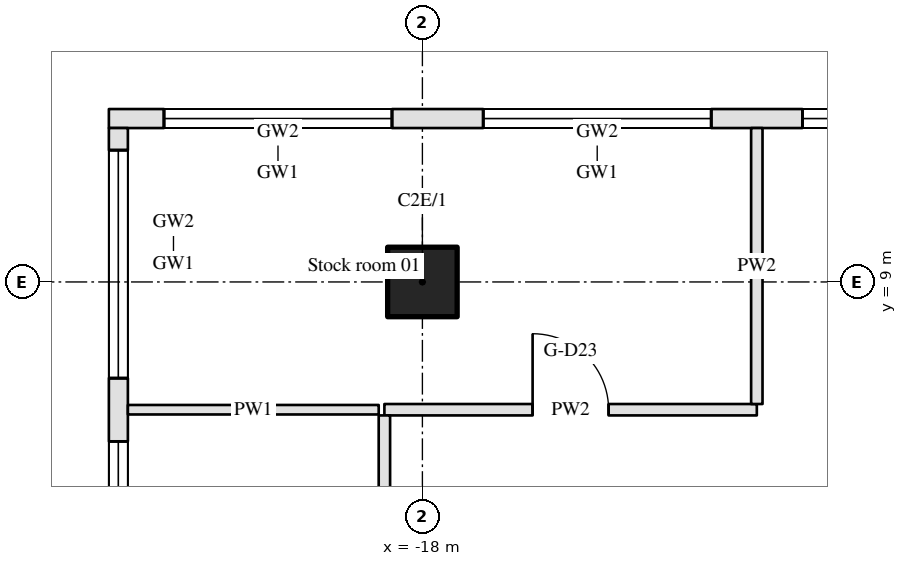
"""IFC4 building model, lengths in metres.
Left out: names, types, materials, properties, quantities, classifications, styles, units other than length and angle.
Written with IfcOpenShell. Run it as: python <this file> out.ifc"""

import sys

from ifc_helpers import new_model, si_unit, direction, frame, frame_2d, origin, origin_2d, place, context, subcontext, project, spatial, rectangle, hollow_circle, extrude, element, fill, save


model = new_model("IFC4")
c1 = context("Model", 3, precision=1e-05, world=origin(), true_north=direction((0.0, 1.0)))
c2 = subcontext(c1, "Body", "Model", "MODEL_VIEW")
j1 = project(units=[si_unit("LENGTHUNIT", "METRE"), si_unit("PLANEANGLEUNIT", "RADIAN")], contexts=[c1])
p1 = place(None, origin())
s1 = spatial("IfcSite", under=j1, at=p1, CompositionType="ELEMENT")
p2 = place(p1, origin())
s2 = spatial("IfcBuilding", under=s1, at=p2, CompositionType="ELEMENT")
p3 = place(p2, origin())
s3 = spatial("IfcBuildingStorey", under=s2, at=p3, CompositionType="ELEMENT", Elevation=0.0)
p4 = place(p3, frame((-18.0, 9.0, 0.0), z_axis=(0.0, 0.0, 1.0), x_axis=(1.0, 0.0, 0.0)))
e1 = element("IfcColumn", 1, at=p4, inside=s3, PredefinedType="COLUMN", context=c2, shape_type="SweptSolid", body=[
    extrude(hollow_circle(Radius=0.457, WallThickness=0.05, at=origin_2d()), origin(), (0.0, 0.0, 1.0), 10.8),
])
p5 = place(p3, frame((20.125, 11.15, 0.0), z_axis=(0.0, 0.0, 1.0), x_axis=(-1.0, 0.0, 0.0)))
e2 = element("IfcWall", 2, at=p5, inside=s3, PredefinedType="STANDARD", context=c2, shape_type="SweptSolid", body=[
    extrude(rectangle(XDim=42.25, YDim=0.25, at=frame_2d((21.125, 0.0))), origin(), (0.0, 0.0, 1.0), 10.0),
])
p6 = place(p5, frame((0.725, 0.0, 0.15)))
e3 = element("IfcOpeningElement", 3, at=p6, cuts=e2, PredefinedType="OPENING", context=c2, shape_type="SweptSolid", body=[
    extrude(rectangle(XDim=3.0, YDim=4.2, at=frame_2d((1.5, 2.1))), frame((0.0, 0.135, 0.0), z_axis=(0.0, -1.0, 0.0), x_axis=(1.0, 0.0, 0.0)), (0.0, 0.0, 1.0), 0.27),
])
p7 = place(p5, frame((0.725, 0.0, 4.95)))
e4 = element("IfcOpeningElement", 4, at=p7, cuts=e2, PredefinedType="OPENING", context=c2, shape_type="SweptSolid", body=[
    extrude(rectangle(XDim=3.0, YDim=4.4, at=frame_2d((1.5, 2.2))), frame((0.0, 0.135, 0.0), z_axis=(0.0, -1.0, 0.0), x_axis=(1.0, 0.0, 0.0)), (0.0, 0.0, 1.0), 0.27),
])
p8 = place(p5, frame((4.925, 0.0, 0.15)))
e5 = element("IfcOpeningElement", 5, at=p8, cuts=e2, PredefinedType="OPENING", context=c2, shape_type="SweptSolid", body=[
    extrude(rectangle(XDim=3.0, YDim=4.2, at=frame_2d((1.5, 2.1))), frame((0.0, 0.135, 0.0), z_axis=(0.0, -1.0, 0.0), x_axis=(1.0, 0.0, 0.0)), (0.0, 0.0, 1.0), 0.27),
])
p9 = place(p5, frame((4.925, 0.0, 4.95)))
e6 = element("IfcOpeningElement", 6, at=p9, cuts=e2, PredefinedType="OPENING", context=c2, shape_type="SweptSolid", body=[
    extrude(rectangle(XDim=3.0, YDim=4.4, at=frame_2d((1.5, 2.2))), frame((0.0, 0.135, 0.0), z_axis=(0.0, -1.0, 0.0), x_axis=(1.0, 0.0, 0.0)), (0.0, 0.0, 1.0), 0.27),
])
p10 = place(p5, frame((9.125, 0.0, 0.15)))
e7 = element("IfcOpeningElement", 7, at=p10, cuts=e2, PredefinedType="OPENING", context=c2, shape_type="SweptSolid", body=[
    extrude(rectangle(XDim=3.0, YDim=4.2, at=frame_2d((1.5, 2.1))), frame((0.0, 0.135, 0.0), z_axis=(0.0, -1.0, 0.0), x_axis=(1.0, 0.0, 0.0)), (0.0, 0.0, 1.0), 0.27),
])
p11 = place(p5, frame((9.125, 0.0, 4.95)))
e8 = element("IfcOpeningElement", 8, at=p11, cuts=e2, PredefinedType="OPENING", context=c2, shape_type="SweptSolid", body=[
    extrude(rectangle(XDim=3.0, YDim=4.4, at=frame_2d((1.5, 2.2))), frame((0.0, 0.135, 0.0), z_axis=(0.0, -1.0, 0.0), x_axis=(1.0, 0.0, 0.0)), (0.0, 0.0, 1.0), 0.27),
])
p12 = place(p5, frame((13.925, 0.0, 0.0)))
e9 = element("IfcOpeningElement", 9, at=p12, cuts=e2, PredefinedType="OPENING", context=c2, shape_type="SweptSolid", body=[
    extrude(rectangle(XDim=1.8, YDim=2.4, at=frame_2d((0.9, 1.2))), frame((0.0, 0.135, 0.0), z_axis=(0.0, -1.0, 0.0), x_axis=(1.0, 0.0, 0.0)), (0.0, 0.0, 1.0), 0.27),
])
p13 = place(p5, frame((17.525, 0.0, 0.15)))
e10 = element("IfcOpeningElement", 10, at=p13, cuts=e2, PredefinedType="OPENING", context=c2, shape_type="SweptSolid", body=[
    extrude(rectangle(XDim=3.0, YDim=4.2, at=frame_2d((1.5, 2.1))), frame((0.0, 0.135, 0.0), z_axis=(0.0, -1.0, 0.0), x_axis=(1.0, 0.0, 0.0)), (0.0, 0.0, 1.0), 0.27),
])
p14 = place(p5, frame((17.525, 0.0, 4.95)))
e11 = element("IfcOpeningElement", 11, at=p14, cuts=e2, PredefinedType="OPENING", context=c2, shape_type="SweptSolid", body=[
    extrude(rectangle(XDim=3.0, YDim=4.4, at=frame_2d((1.5, 2.2))), frame((0.0, 0.135, 0.0), z_axis=(0.0, -1.0, 0.0), x_axis=(1.0, 0.0, 0.0)), (0.0, 0.0, 1.0), 0.27),
])
p15 = place(p5, frame((21.725, 0.0, 0.15)))
e12 = element("IfcOpeningElement", 12, at=p15, cuts=e2, PredefinedType="OPENING", context=c2, shape_type="SweptSolid", body=[
    extrude(rectangle(XDim=3.0, YDim=4.2, at=frame_2d((1.5, 2.1))), frame((0.0, 0.135, 0.0), z_axis=(0.0, -1.0, 0.0), x_axis=(1.0, 0.0, 0.0)), (0.0, 0.0, 1.0), 0.27),
])
p16 = place(p5, frame((21.725, 0.0, 4.95)))
e13 = element("IfcOpeningElement", 13, at=p16, cuts=e2, PredefinedType="OPENING", context=c2, shape_type="SweptSolid", body=[
    extrude(rectangle(XDim=3.0, YDim=4.4, at=frame_2d((1.5, 2.2))), frame((0.0, 0.135, 0.0), z_axis=(0.0, -1.0, 0.0), x_axis=(1.0, 0.0, 0.0)), (0.0, 0.0, 1.0), 0.27),
])
p17 = place(p5, frame((26.225, 0.0, 0.0)))
e14 = element("IfcOpeningElement", 14, at=p17, cuts=e2, PredefinedType="OPENING", context=c2, shape_type="SweptSolid", body=[
    extrude(rectangle(XDim=2.4, YDim=2.6, at=frame_2d((1.2, 1.3))), frame((0.0, 0.135, 0.0), z_axis=(0.0, -1.0, 0.0), x_axis=(1.0, 0.0, 0.0)), (0.0, 0.0, 1.0), 0.27),
])
p18 = place(p5, frame((25.925, 0.0, 2.9)))
e15 = element("IfcOpeningElement", 15, at=p18, cuts=e2, PredefinedType="OPENING", context=c2, shape_type="SweptSolid", body=[
    extrude(rectangle(XDim=3.0, YDim=1.45, at=frame_2d((1.5, 0.725))), frame((0.0, 0.135, 0.0), z_axis=(0.0, -1.0, 0.0), x_axis=(1.0, 0.0, 0.0)), (0.0, 0.0, 1.0), 0.27),
])
p19 = place(p5, frame((25.925, 0.0, 4.95)))
e16 = element("IfcOpeningElement", 16, at=p19, cuts=e2, PredefinedType="OPENING", context=c2, shape_type="SweptSolid", body=[
    extrude(rectangle(XDim=3.0, YDim=4.4, at=frame_2d((1.5, 2.2))), frame((0.0, 0.135, 0.0), z_axis=(0.0, -1.0, 0.0), x_axis=(1.0, 0.0, 0.0)), (0.0, 0.0, 1.0), 0.27),
])
p20 = place(p5, frame((30.125, 0.0, 0.15)))
e17 = element("IfcOpeningElement", 17, at=p20, cuts=e2, PredefinedType="OPENING", context=c2, shape_type="SweptSolid", body=[
    extrude(rectangle(XDim=3.0, YDim=4.2, at=frame_2d((1.5, 2.1))), frame((0.0, 0.135, 0.0), z_axis=(0.0, -1.0, 0.0), x_axis=(1.0, 0.0, 0.0)), (0.0, 0.0, 1.0), 0.27),
])
p21 = place(p5, frame((30.125, 0.0, 4.95)))
e18 = element("IfcOpeningElement", 18, at=p21, cuts=e2, PredefinedType="OPENING", context=c2, shape_type="SweptSolid", body=[
    extrude(rectangle(XDim=3.0, YDim=4.4, at=frame_2d((1.5, 2.2))), frame((0.0, 0.135, 0.0), z_axis=(0.0, -1.0, 0.0), x_axis=(1.0, 0.0, 0.0)), (0.0, 0.0, 1.0), 0.27),
])
p22 = place(p5, frame((34.325, 0.0, 0.15)))
e19 = element("IfcOpeningElement", 19, at=p22, cuts=e2, PredefinedType="OPENING", context=c2, shape_type="SweptSolid", body=[
    extrude(rectangle(XDim=3.0, YDim=4.2, at=frame_2d((1.5, 2.1))), frame((0.0, 0.135, 0.0), z_axis=(0.0, -1.0, 0.0), x_axis=(1.0, 0.0, 0.0)), (0.0, 0.0, 1.0), 0.27),
])
p23 = place(p5, frame((34.325, 0.0, 4.95)))
e20 = element("IfcOpeningElement", 20, at=p23, cuts=e2, PredefinedType="OPENING", context=c2, shape_type="SweptSolid", body=[
    extrude(rectangle(XDim=3.0, YDim=4.4, at=frame_2d((1.5, 2.2))), frame((0.0, 0.135, 0.0), z_axis=(0.0, -1.0, 0.0), x_axis=(1.0, 0.0, 0.0)), (0.0, 0.0, 1.0), 0.27),
])
p24 = place(p5, frame((38.525, 0.0, 0.15)))
e21 = element("IfcOpeningElement", 21, at=p24, cuts=e2, PredefinedType="OPENING", context=c2, shape_type="SweptSolid", body=[
    extrude(rectangle(XDim=3.0, YDim=4.2, at=frame_2d((1.5, 2.1))), frame((0.0, 0.135, 0.0), z_axis=(0.0, -1.0, 0.0), x_axis=(1.0, 0.0, 0.0)), (0.0, 0.0, 1.0), 0.27),
])
p25 = place(p5, frame((38.525, 0.0, 4.95)))
e22 = element("IfcOpeningElement", 22, at=p25, cuts=e2, PredefinedType="OPENING", context=c2, shape_type="SweptSolid", body=[
    extrude(rectangle(XDim=3.0, YDim=4.4, at=frame_2d((1.5, 2.2))), frame((0.0, 0.135, 0.0), z_axis=(0.0, -1.0, 0.0), x_axis=(1.0, 0.0, 0.0)), (0.0, 0.0, 1.0), 0.27),
])
p26 = place(p3, frame((-22.0, 11.025, 0.0), z_axis=(0.0, 0.0, 1.0), x_axis=(0.0, -1.0, 0.0)))
e23 = element("IfcWall", 23, at=p26, inside=s3, PredefinedType="STANDARD", context=c2, shape_type="SweptSolid", body=[
    extrude(rectangle(XDim=30.4, YDim=0.25, at=frame_2d((15.2, 0.0))), origin(), (0.0, 0.0, 1.0), 10.0),
])
p27 = place(p26, frame((0.291, 0.0, 0.15)))
e24 = element("IfcOpeningElement", 24, at=p27, cuts=e23, PredefinedType="OPENING", context=c2, shape_type="SweptSolid", body=[
    extrude(rectangle(XDim=3.0, YDim=4.2, at=frame_2d((1.5, 2.1))), frame((0.0, 0.135, 0.0), z_axis=(0.0, -1.0, 0.0), x_axis=(1.0, 0.0, 0.0)), (0.0, 0.0, 1.0), 0.27),
])
p28 = place(p26, frame((0.291, 0.0, 4.95)))
e25 = element("IfcOpeningElement", 25, at=p28, cuts=e23, PredefinedType="OPENING", context=c2, shape_type="SweptSolid", body=[
    extrude(rectangle(XDim=3.0, YDim=4.4, at=frame_2d((1.5, 2.2))), frame((0.0, 0.135, 0.0), z_axis=(0.0, -1.0, 0.0), x_axis=(1.0, 0.0, 0.0)), (0.0, 0.0, 1.0), 0.27),
])
p29 = place(p26, frame((4.122, 0.0, 0.15)))
e26 = element("IfcOpeningElement", 26, at=p29, cuts=e23, PredefinedType="OPENING", context=c2, shape_type="SweptSolid", body=[
    extrude(rectangle(XDim=3.0, YDim=4.2, at=frame_2d((1.5, 2.1))), frame((0.0, 0.135, 0.0), z_axis=(0.0, -1.0, 0.0), x_axis=(1.0, 0.0, 0.0)), (0.0, 0.0, 1.0), 0.27),
])
p30 = place(p26, frame((4.122, 0.0, 4.95)))
e27 = element("IfcOpeningElement", 27, at=p30, cuts=e23, PredefinedType="OPENING", context=c2, shape_type="SweptSolid", body=[
    extrude(rectangle(XDim=3.0, YDim=4.4, at=frame_2d((1.5, 2.2))), frame((0.0, 0.135, 0.0), z_axis=(0.0, -1.0, 0.0), x_axis=(1.0, 0.0, 0.0)), (0.0, 0.0, 1.0), 0.27),
])
p31 = place(p26, frame((7.953, 0.0, 0.15)))
e28 = element("IfcOpeningElement", 28, at=p31, cuts=e23, PredefinedType="OPENING", context=c2, shape_type="SweptSolid", body=[
    extrude(rectangle(XDim=3.0, YDim=4.2, at=frame_2d((1.5, 2.1))), frame((0.0, 0.135, 0.0), z_axis=(0.0, -1.0, 0.0), x_axis=(1.0, 0.0, 0.0)), (0.0, 0.0, 1.0), 0.27),
])
p32 = place(p26, frame((7.953, 0.0, 4.95)))
e29 = element("IfcOpeningElement", 29, at=p32, cuts=e23, PredefinedType="OPENING", context=c2, shape_type="SweptSolid", body=[
    extrude(rectangle(XDim=3.0, YDim=4.4, at=frame_2d((1.5, 2.2))), frame((0.0, 0.135, 0.0), z_axis=(0.0, -1.0, 0.0), x_axis=(1.0, 0.0, 0.0)), (0.0, 0.0, 1.0), 0.27),
])
p33 = place(p26, frame((11.784, 0.0, 0.15)))
e30 = element("IfcOpeningElement", 30, at=p33, cuts=e23, PredefinedType="OPENING", context=c2, shape_type="SweptSolid", body=[
    extrude(rectangle(XDim=3.0, YDim=4.2, at=frame_2d((1.5, 2.1))), frame((0.0, 0.135, 0.0), z_axis=(0.0, -1.0, 0.0), x_axis=(1.0, 0.0, 0.0)), (0.0, 0.0, 1.0), 0.27),
])
p34 = place(p26, frame((11.784, 0.0, 4.95)))
e31 = element("IfcOpeningElement", 31, at=p34, cuts=e23, PredefinedType="OPENING", context=c2, shape_type="SweptSolid", body=[
    extrude(rectangle(XDim=3.0, YDim=4.4, at=frame_2d((1.5, 2.2))), frame((0.0, 0.135, 0.0), z_axis=(0.0, -1.0, 0.0), x_axis=(1.0, 0.0, 0.0)), (0.0, 0.0, 1.0), 0.27),
])
p35 = place(p26, frame((15.916, 0.0, 0.0)))
e32 = element("IfcOpeningElement", 32, at=p35, cuts=e23, PredefinedType="OPENING", context=c2, shape_type="SweptSolid", body=[
    extrude(rectangle(XDim=2.4, YDim=2.6, at=frame_2d((1.2, 1.3))), frame((0.0, 0.135, 0.0), z_axis=(0.0, -1.0, 0.0), x_axis=(1.0, 0.0, 0.0)), (0.0, 0.0, 1.0), 0.27),
])
p36 = place(p26, frame((15.616, 0.0, 2.9)))
e33 = element("IfcOpeningElement", 33, at=p36, cuts=e23, PredefinedType="OPENING", context=c2, shape_type="SweptSolid", body=[
    extrude(rectangle(XDim=3.0, YDim=1.45, at=frame_2d((1.5, 0.725))), frame((0.0, 0.135, 0.0), z_axis=(0.0, -1.0, 0.0), x_axis=(1.0, 0.0, 0.0)), (0.0, 0.0, 1.0), 0.27),
])
p37 = place(p26, frame((15.616, 0.0, 4.95)))
e34 = element("IfcOpeningElement", 34, at=p37, cuts=e23, PredefinedType="OPENING", context=c2, shape_type="SweptSolid", body=[
    extrude(rectangle(XDim=3.0, YDim=4.4, at=frame_2d((1.5, 2.2))), frame((0.0, 0.135, 0.0), z_axis=(0.0, -1.0, 0.0), x_axis=(1.0, 0.0, 0.0)), (0.0, 0.0, 1.0), 0.27),
])
p38 = place(p26, frame((19.447, 0.0, 0.15)))
e35 = element("IfcOpeningElement", 35, at=p38, cuts=e23, PredefinedType="OPENING", context=c2, shape_type="SweptSolid", body=[
    extrude(rectangle(XDim=3.0, YDim=4.2, at=frame_2d((1.5, 2.1))), frame((0.0, 0.135, 0.0), z_axis=(0.0, -1.0, 0.0), x_axis=(1.0, 0.0, 0.0)), (0.0, 0.0, 1.0), 0.27),
])
p39 = place(p26, frame((19.447, 0.0, 4.95)))
e36 = element("IfcOpeningElement", 36, at=p39, cuts=e23, PredefinedType="OPENING", context=c2, shape_type="SweptSolid", body=[
    extrude(rectangle(XDim=3.0, YDim=4.4, at=frame_2d((1.5, 2.2))), frame((0.0, 0.135, 0.0), z_axis=(0.0, -1.0, 0.0), x_axis=(1.0, 0.0, 0.0)), (0.0, 0.0, 1.0), 0.27),
])
p40 = place(p26, frame((23.278, 0.0, 0.15)))
e37 = element("IfcOpeningElement", 37, at=p40, cuts=e23, PredefinedType="OPENING", context=c2, shape_type="SweptSolid", body=[
    extrude(rectangle(XDim=3.0, YDim=4.2, at=frame_2d((1.5, 2.1))), frame((0.0, 0.135, 0.0), z_axis=(0.0, -1.0, 0.0), x_axis=(1.0, 0.0, 0.0)), (0.0, 0.0, 1.0), 0.27),
])
p41 = place(p26, frame((23.278, 0.0, 4.95)))
e38 = element("IfcOpeningElement", 38, at=p41, cuts=e23, PredefinedType="OPENING", context=c2, shape_type="SweptSolid", body=[
    extrude(rectangle(XDim=3.0, YDim=4.4, at=frame_2d((1.5, 2.2))), frame((0.0, 0.135, 0.0), z_axis=(0.0, -1.0, 0.0), x_axis=(1.0, 0.0, 0.0)), (0.0, 0.0, 1.0), 0.27),
])
p42 = place(p26, frame((27.109, 0.0, 0.15)))
e39 = element("IfcOpeningElement", 39, at=p42, cuts=e23, PredefinedType="OPENING", context=c2, shape_type="SweptSolid", body=[
    extrude(rectangle(XDim=3.0, YDim=4.2, at=frame_2d((1.5, 2.1))), frame((0.0, 0.135, 0.0), z_axis=(0.0, -1.0, 0.0), x_axis=(1.0, 0.0, 0.0)), (0.0, 0.0, 1.0), 0.27),
])
p43 = place(p26, frame((27.109, 0.0, 4.95)))
e40 = element("IfcOpeningElement", 40, at=p43, cuts=e23, PredefinedType="OPENING", context=c2, shape_type="SweptSolid", body=[
    extrude(rectangle(XDim=3.0, YDim=4.4, at=frame_2d((1.5, 2.2))), frame((0.0, 0.135, 0.0), z_axis=(0.0, -1.0, 0.0), x_axis=(1.0, 0.0, 0.0)), (0.0, 0.0, 1.0), 0.27),
])
p44 = place(p3, frame((-21.875, 7.319, 0.0), z_axis=(0.0, 0.0, 1.0), x_axis=(1.0, 0.0, 0.0)))
e41 = element("IfcWall", 41, at=p44, inside=s3, PredefinedType="PARTITIONING", context=c2, shape_type="SweptSolid", body=[
    extrude(rectangle(XDim=3.3, YDim=0.125, at=frame_2d((1.65, 0.0))), origin(), (0.0, 0.0, 1.0), 9.86),
])
p45 = place(p3, frame((-18.5, 7.319, 0.0), z_axis=(0.0, 0.0, 1.0), x_axis=(1.0, 0.0, 0.0)))
e42 = element("IfcWall", 42, at=p45, inside=s3, PredefinedType="PARTITIONING", context=c2, shape_type="SweptSolid", body=[
    extrude(rectangle(XDim=4.9, YDim=0.15, at=frame_2d((2.45, 0.0))), origin(), (0.0, 0.0, 1.0), 9.86),
])
p46 = place(p45, frame((1.95, 0.0, 0.0)))
e43 = element("IfcOpeningElement", 43, at=p46, cuts=e42, PredefinedType="OPENING", context=c2, shape_type="SweptSolid", body=[
    extrude(rectangle(XDim=1.0, YDim=2.1, at=frame_2d((0.5, 1.05))), frame((0.0, 0.085, 0.0), z_axis=(0.0, -1.0, 0.0), x_axis=(1.0, 0.0, 0.0)), (0.0, 0.0, 1.0), 0.17),
])
p47 = place(p3, frame((-18.5, 0.5, 0.0), z_axis=(0.0, 0.0, 1.0), x_axis=(0.0, 1.0, 0.0)))
e44 = element("IfcWall", 44, at=p47, inside=s3, PredefinedType="PARTITIONING", context=c2, shape_type="SweptSolid", body=[
    extrude(rectangle(XDim=6.744, YDim=0.15, at=frame_2d((3.372, 0.0))), origin(), (0.0, 0.0, 1.0), 9.86),
])
p48 = place(p47, frame((2.872, 0.0, 0.0)))
e45 = element("IfcOpeningElement", 45, at=p48, cuts=e44, PredefinedType="OPENING", context=c2, shape_type="SweptSolid", body=[
    extrude(rectangle(XDim=1.0, YDim=2.1, at=frame_2d((0.5, 1.05))), frame((0.0, 0.085, 0.0), z_axis=(0.0, -1.0, 0.0), x_axis=(1.0, 0.0, 0.0)), (0.0, 0.0, 1.0), 0.17),
])
p49 = place(p3, frame((-13.6, 7.394, 0.0), z_axis=(0.0, 0.0, 1.0), x_axis=(0.0, 1.0, 0.0)))
e46 = element("IfcWall", 46, at=p49, inside=s3, PredefinedType="PARTITIONING", context=c2, shape_type="SweptSolid", body=[
    extrude(rectangle(XDim=3.631, YDim=0.15, at=frame_2d((1.815, 0.0))), origin(), (0.0, 0.0, 1.0), 9.86),
])
p50 = place(p20, origin())
e47 = element("IfcWindow", 47, at=p50, inside=s3, PartitioningType="DOUBLE_PANEL_HORIZONTAL", PredefinedType="WINDOW", context=c2, shape_type="SweptSolid", body=[
    extrude(rectangle(XDim=3.0, YDim=4.2, at=frame_2d((1.5, 2.1))), frame((0.0, 0.03, 0.0), z_axis=(0.0, -1.0, 0.0), x_axis=(1.0, 0.0, 0.0)), (0.0, 0.0, 1.0), 0.06),
])
fill(e17, e47)
p51 = place(p21, origin())
e48 = element("IfcWindow", 48, at=p51, inside=s3, PartitioningType="DOUBLE_PANEL_HORIZONTAL", PredefinedType="WINDOW", context=c2, shape_type="SweptSolid", body=[
    extrude(rectangle(XDim=3.0, YDim=4.4, at=frame_2d((1.5, 2.2))), frame((0.0, 0.03, 0.0), z_axis=(0.0, -1.0, 0.0), x_axis=(1.0, 0.0, 0.0)), (0.0, 0.0, 1.0), 0.06),
])
fill(e18, e48)
p52 = place(p22, origin())
e49 = element("IfcWindow", 49, at=p52, inside=s3, PartitioningType="DOUBLE_PANEL_HORIZONTAL", PredefinedType="WINDOW", context=c2, shape_type="SweptSolid", body=[
    extrude(rectangle(XDim=3.0, YDim=4.2, at=frame_2d((1.5, 2.1))), frame((0.0, 0.03, 0.0), z_axis=(0.0, -1.0, 0.0), x_axis=(1.0, 0.0, 0.0)), (0.0, 0.0, 1.0), 0.06),
])
fill(e19, e49)
p53 = place(p23, origin())
e50 = element("IfcWindow", 50, at=p53, inside=s3, PartitioningType="DOUBLE_PANEL_HORIZONTAL", PredefinedType="WINDOW", context=c2, shape_type="SweptSolid", body=[
    extrude(rectangle(XDim=3.0, YDim=4.4, at=frame_2d((1.5, 2.2))), frame((0.0, 0.03, 0.0), z_axis=(0.0, -1.0, 0.0), x_axis=(1.0, 0.0, 0.0)), (0.0, 0.0, 1.0), 0.06),
])
fill(e20, e50)
p54 = place(p24, origin())
e51 = element("IfcWindow", 51, at=p54, inside=s3, PartitioningType="DOUBLE_PANEL_HORIZONTAL", PredefinedType="WINDOW", context=c2, shape_type="SweptSolid", body=[
    extrude(rectangle(XDim=3.0, YDim=4.2, at=frame_2d((1.5, 2.1))), frame((0.0, 0.03, 0.0), z_axis=(0.0, -1.0, 0.0), x_axis=(1.0, 0.0, 0.0)), (0.0, 0.0, 1.0), 0.06),
])
fill(e21, e51)
p55 = place(p25, origin())
e52 = element("IfcWindow", 52, at=p55, inside=s3, PartitioningType="DOUBLE_PANEL_HORIZONTAL", PredefinedType="WINDOW", context=c2, shape_type="SweptSolid", body=[
    extrude(rectangle(XDim=3.0, YDim=4.4, at=frame_2d((1.5, 2.2))), frame((0.0, 0.03, 0.0), z_axis=(0.0, -1.0, 0.0), x_axis=(1.0, 0.0, 0.0)), (0.0, 0.0, 1.0), 0.06),
])
fill(e22, e52)
p56 = place(p27, origin())
e53 = element("IfcWindow", 53, at=p56, inside=s3, PartitioningType="DOUBLE_PANEL_HORIZONTAL", PredefinedType="WINDOW", context=c2, shape_type="SweptSolid", body=[
    extrude(rectangle(XDim=3.0, YDim=4.2, at=frame_2d((1.5, 2.1))), frame((0.0, 0.03, 0.0), z_axis=(0.0, -1.0, 0.0), x_axis=(1.0, 0.0, 0.0)), (0.0, 0.0, 1.0), 0.06),
])
fill(e24, e53)
p57 = place(p28, origin())
e54 = element("IfcWindow", 54, at=p57, inside=s3, PartitioningType="DOUBLE_PANEL_HORIZONTAL", PredefinedType="WINDOW", context=c2, shape_type="SweptSolid", body=[
    extrude(rectangle(XDim=3.0, YDim=4.4, at=frame_2d((1.5, 2.2))), frame((0.0, 0.03, 0.0), z_axis=(0.0, -1.0, 0.0), x_axis=(1.0, 0.0, 0.0)), (0.0, 0.0, 1.0), 0.06),
])
fill(e25, e54)
p58 = place(p29, origin())
e55 = element("IfcWindow", 55, at=p58, inside=s3, PartitioningType="DOUBLE_PANEL_HORIZONTAL", PredefinedType="WINDOW", context=c2, shape_type="SweptSolid", body=[
    extrude(rectangle(XDim=3.0, YDim=4.2, at=frame_2d((1.5, 2.1))), frame((0.0, 0.03, 0.0), z_axis=(0.0, -1.0, 0.0), x_axis=(1.0, 0.0, 0.0)), (0.0, 0.0, 1.0), 0.06),
])
fill(e26, e55)
p59 = place(p30, origin())
e56 = element("IfcWindow", 56, at=p59, inside=s3, PartitioningType="DOUBLE_PANEL_HORIZONTAL", PredefinedType="WINDOW", context=c2, shape_type="SweptSolid", body=[
    extrude(rectangle(XDim=3.0, YDim=4.4, at=frame_2d((1.5, 2.2))), frame((0.0, 0.03, 0.0), z_axis=(0.0, -1.0, 0.0), x_axis=(1.0, 0.0, 0.0)), (0.0, 0.0, 1.0), 0.06),
])
fill(e27, e56)
p60 = place(p46, origin())
e57 = element("IfcDoor", 57, at=p60, inside=s3, OperationType="SINGLE_SWING_LEFT", PredefinedType="DOOR", context=c2, shape_type="SweptSolid", body=[
    extrude(rectangle(XDim=1.0, YDim=2.1, at=frame_2d((0.5, 1.05))), frame((0.0, 0.025, 0.0), z_axis=(0.0, -1.0, 0.0), x_axis=(1.0, 0.0, 0.0)), (0.0, 0.0, 1.0), 0.05),
])
fill(e43, e57)
save(model, sys.argv[1])
